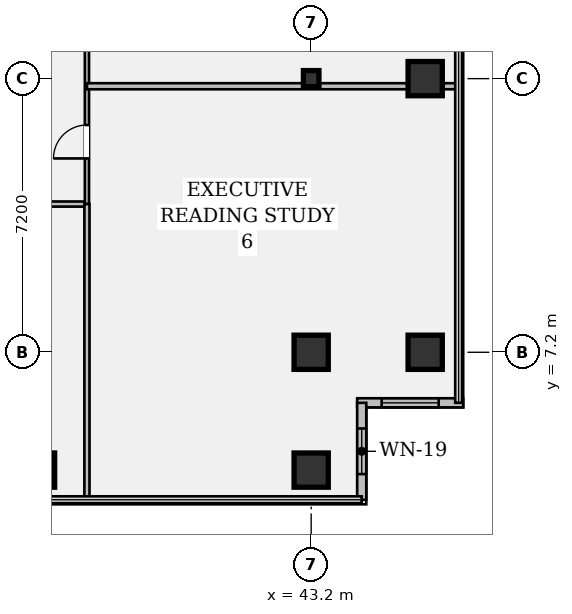
"""IFC4 building model, lengths in metres.
Left out: names, types, materials, properties, quantities, classifications, styles, units other than length and angle.
Written with IfcOpenShell. Run it as: python <this file> out.ifc"""

import sys

from ifc_helpers import new_model, si_unit, direction, frame, frame_2d, origin, origin_2d, place, context, subcontext, project, spatial, rectangle, hollow_rectangle, i_section, extrude, element, fill, save


model = new_model("IFC4")
c1 = context("Model", 3, precision=1e-05, world=origin(), true_north=direction((0.0, 1.0)))
c2 = subcontext(c1, "Body", "Model", "MODEL_VIEW")
j1 = project(units=[si_unit("LENGTHUNIT", "METRE"), si_unit("PLANEANGLEUNIT", "RADIAN")], contexts=[c1])
p1 = place(None, origin())
s1 = spatial("IfcSite", under=j1, at=p1, CompositionType="ELEMENT")
p2 = place(p1, origin())
s2 = spatial("IfcBuilding", under=s1, at=p2, CompositionType="ELEMENT")
p3 = place(p2, frame((0.0, 0.0, 136.85)))
s3 = spatial("IfcBuildingStorey", under=s2, at=p3, CompositionType="ELEMENT", Elevation=136.85)
for number, where, z_axis, x_axis in (
    (1, (36.0, 4.1, 0.0), (0.0, 0.0, 1.0), (1.0, 0.0, 0.0)),
    (2, (43.2, 4.1, 0.0), (0.0, 0.0, 1.0), (1.0, 0.0, 0.0)),
    (3, (43.2, 7.2, 0.0), (0.0, 0.0, 1.0), (1.0, 0.0, 0.0)),
):
    element("IfcColumn", number, at=place(p3, frame(where, z_axis=z_axis, x_axis=x_axis)), inside=s3, PredefinedType="COLUMN", context=c2, shape_type="SweptSolid", body=[
        extrude(hollow_rectangle(XDim=0.9, YDim=0.9, WallThickness=0.055, at=origin_2d()), origin(), (0.0, 0.0, 1.0), 3.58),
    ])
p4 = place(p3, frame((43.2, 14.4, 0.0), z_axis=(0.0, 0.0, 1.0), x_axis=(1.0, 0.0, 0.0)))
e4 = element("IfcColumn", 4, at=p4, inside=s3, PredefinedType="COLUMN", context=c2, shape_type="SweptSolid", body=[
    extrude(i_section(OverallWidth=0.409, OverallDepth=0.424, WebThickness=0.033, FlangeThickness=0.052, FilletRadius=0.018, at=origin_2d()), origin(), (0.0, 0.0, 1.0), 3.58),
])
for number, where, z_axis, x_axis in (
    (5, (46.2, 7.2, 0.0), (0.0, 0.0, 1.0), (1.0, 0.0, 0.0)),
    (6, (46.2, 14.4, 0.0), (0.0, 0.0, 1.0), (1.0, 0.0, 0.0)),
):
    element("IfcColumn", number, at=place(p3, frame(where, z_axis=z_axis, x_axis=x_axis)), inside=s3, PredefinedType="COLUMN", context=c2, shape_type="SweptSolid", body=[
        extrude(hollow_rectangle(XDim=0.9, YDim=0.9, WallThickness=0.055, at=origin_2d()), origin(), (0.0, 0.0, 1.0), 3.58),
    ])
p5 = place(p3, frame((47.2, 5.87, 0.0), z_axis=(0.0, 0.0, 1.0), x_axis=(-1.0, 0.0, 0.0)))
e7 = element("IfcWall", 7, at=p5, inside=s3, PredefinedType="STANDARD", context=c2, shape_type="SweptSolid", body=[
    extrude(rectangle(XDim=2.79, YDim=0.24, at=frame_2d((1.395, 0.0))), origin(), (0.0, 0.0, 1.0), 3.58),
])
p6 = place(p5, frame((0.645, 0.0, 0.95)))
e8 = element("IfcOpeningElement", 8, at=p6, cuts=e7, PredefinedType="OPENING", context=c2, shape_type="SweptSolid", body=[
    extrude(rectangle(XDim=1.5, YDim=1.8, at=frame_2d((0.75, 0.9))), frame((0.0, 0.132, 0.0), z_axis=(0.0, -1.0, 0.0), x_axis=(1.0, 0.0, 0.0)), (0.0, 0.0, 1.0), 0.264),
])
p7 = place(p3, frame((44.53, 5.87, 0.0), z_axis=(0.0, 0.0, 1.0), x_axis=(0.0, -1.0, 0.0)))
e9 = element("IfcWall", 9, at=p7, inside=s3, PredefinedType="STANDARD", context=c2, shape_type="SweptSolid", body=[
    extrude(rectangle(XDim=2.55, YDim=0.24, at=frame_2d((1.275, 0.0))), origin(), (0.0, 0.0, 1.0), 3.58),
])
p8 = place(p7, frame((0.675, 0.0, 0.95)))
e10 = element("IfcOpeningElement", 10, at=p8, cuts=e9, PredefinedType="OPENING", context=c2, shape_type="SweptSolid", body=[
    extrude(rectangle(XDim=1.2, YDim=1.8, at=frame_2d((0.6, 0.9))), frame((0.0, 0.132, 0.0), z_axis=(0.0, -1.0, 0.0), x_axis=(1.0, 0.0, 0.0)), (0.0, 0.0, 1.0), 0.264),
])
p9 = place(p3, frame((17.35, 11.1, 0.0), z_axis=(0.0, 0.0, 1.0), x_axis=(1.0, 0.0, 0.0)))
e11 = element("IfcWall", 11, at=p9, inside=s3, PredefinedType="PARTITIONING", context=c2, shape_type="SweptSolid", body=[
    extrude(rectangle(XDim=19.95, YDim=0.135, at=frame_2d((9.975, 0.0))), origin(), (0.0, 0.0, 1.0), 2.869),
])
p10 = place(p9, frame((2.52, 0.0, 0.0)))
e12 = element("IfcOpeningElement", 12, at=p10, cuts=e11, PredefinedType="OPENING", context=c2, shape_type="SweptSolid", body=[
    extrude(rectangle(XDim=0.88, YDim=2.15, at=frame_2d((0.44, 1.075))), frame((0.0, 0.08, 0.0), z_axis=(0.0, -1.0, 0.0), x_axis=(1.0, 0.0, 0.0)), (0.0, 0.0, 1.0), 0.159),
])
p11 = place(p9, frame((9.15, 0.0, 0.0)))
e13 = element("IfcOpeningElement", 13, at=p11, cuts=e11, PredefinedType="OPENING", context=c2, shape_type="SweptSolid", body=[
    extrude(rectangle(XDim=0.88, YDim=2.15, at=frame_2d((0.44, 1.075))), frame((0.0, 0.08, 0.0), z_axis=(0.0, -1.0, 0.0), x_axis=(1.0, 0.0, 0.0)), (0.0, 0.0, 1.0), 0.159),
])
p12 = place(p9, frame((16.1, 0.0, 0.0)))
e14 = element("IfcOpeningElement", 14, at=p12, cuts=e11, PredefinedType="OPENING", context=c2, shape_type="SweptSolid", body=[
    extrude(rectangle(XDim=0.88, YDim=2.15, at=frame_2d((0.44, 1.075))), frame((0.0, 0.08, 0.0), z_axis=(0.0, -1.0, 0.0), x_axis=(1.0, 0.0, 0.0)), (0.0, 0.0, 1.0), 0.159),
])
p13 = place(p3, frame((37.3, 11.1, 0.0), z_axis=(0.0, 0.0, 1.0), x_axis=(0.0, 1.0, 0.0)))
e15 = element("IfcWall", 15, at=p13, inside=s3, PredefinedType="PARTITIONING", context=c2, shape_type="SweptSolid", body=[
    extrude(rectangle(XDim=9.6, YDim=0.11, at=frame_2d((4.8, 0.0))), origin(), (0.0, 0.0, 1.0), 2.869),
])
p14 = place(p13, frame((1.2, 0.0, 0.0)))
e16 = element("IfcOpeningElement", 16, at=p14, cuts=e15, PredefinedType="OPENING", context=c2, shape_type="SweptSolid", body=[
    extrude(rectangle(XDim=0.88, YDim=2.15, at=frame_2d((0.44, 1.075))), frame((0.0, 0.067, 0.0), z_axis=(0.0, -1.0, 0.0), x_axis=(1.0, 0.0, 0.0)), (0.0, 0.0, 1.0), 0.134),
])
p15 = place(p13, frame((7.6, 0.0, 0.0)))
e17 = element("IfcOpeningElement", 17, at=p15, cuts=e15, PredefinedType="OPENING", context=c2, shape_type="SweptSolid", body=[
    extrude(rectangle(XDim=0.88, YDim=2.15, at=frame_2d((0.44, 1.075))), frame((0.0, 0.067, 0.0), z_axis=(0.0, -1.0, 0.0), x_axis=(1.0, 0.0, 0.0)), (0.0, 0.0, 1.0), 0.134),
])
p16 = place(p3, frame((37.3, 3.32, 0.0), z_axis=(0.0, 0.0, 1.0), x_axis=(0.0, 1.0, 0.0)))
e18 = element("IfcWall", 18, at=p16, inside=s3, PredefinedType="PARTITIONING", context=c2, shape_type="SweptSolid", body=[
    extrude(rectangle(XDim=7.78, YDim=0.135, at=frame_2d((3.89, 0.0))), origin(), (0.0, 0.0, 1.0), 2.869),
])
p17 = place(p3, frame((37.3, 14.2, 0.0), z_axis=(0.0, 0.0, 1.0), x_axis=(1.0, 0.0, 0.0)))
e19 = element("IfcWall", 19, at=p17, inside=s3, PredefinedType="PARTITIONING", context=c2, shape_type="SweptSolid", body=[
    extrude(rectangle(XDim=9.78, YDim=0.16, at=frame_2d((4.89, 0.0))), origin(), (0.0, 0.0, 1.0), 2.869),
])
p18 = place(p6, origin())
e20 = element("IfcWindow", 20, at=p18, inside=s3, PartitioningType="SINGLE_PANEL", PredefinedType="WINDOW", context=c2, shape_type="SweptSolid", body=[
    extrude(rectangle(XDim=1.5, YDim=1.8, at=frame_2d((0.75, 0.9))), frame((0.0, 0.03, 0.0), z_axis=(0.0, -1.0, 0.0), x_axis=(1.0, 0.0, 0.0)), (0.0, 0.0, 1.0), 0.06),
])
fill(e8, e20)
p19 = place(p8, origin())
e21 = element("IfcWindow", 21, at=p19, inside=s3, PartitioningType="SINGLE_PANEL", PredefinedType="WINDOW", context=c2, shape_type="SweptSolid", body=[
    extrude(rectangle(XDim=1.2, YDim=1.8, at=frame_2d((0.6, 0.9))), frame((0.0, 0.03, 0.0), z_axis=(0.0, -1.0, 0.0), x_axis=(1.0, 0.0, 0.0)), (0.0, 0.0, 1.0), 0.06),
])
fill(e10, e21)
p20 = place(p14, origin())
e22 = element("IfcDoor", 22, at=p20, inside=s3, OperationType="SINGLE_SWING_LEFT", PredefinedType="DOOR", context=c2, shape_type="SweptSolid", body=[
    extrude(rectangle(XDim=0.88, YDim=2.15, at=frame_2d((0.44, 1.075))), frame((0.0, 0.025, 0.0), z_axis=(0.0, -1.0, 0.0), x_axis=(1.0, 0.0, 0.0)), (0.0, 0.0, 1.0), 0.05),
])
fill(e16, e22)
save(model, sys.argv[1])
